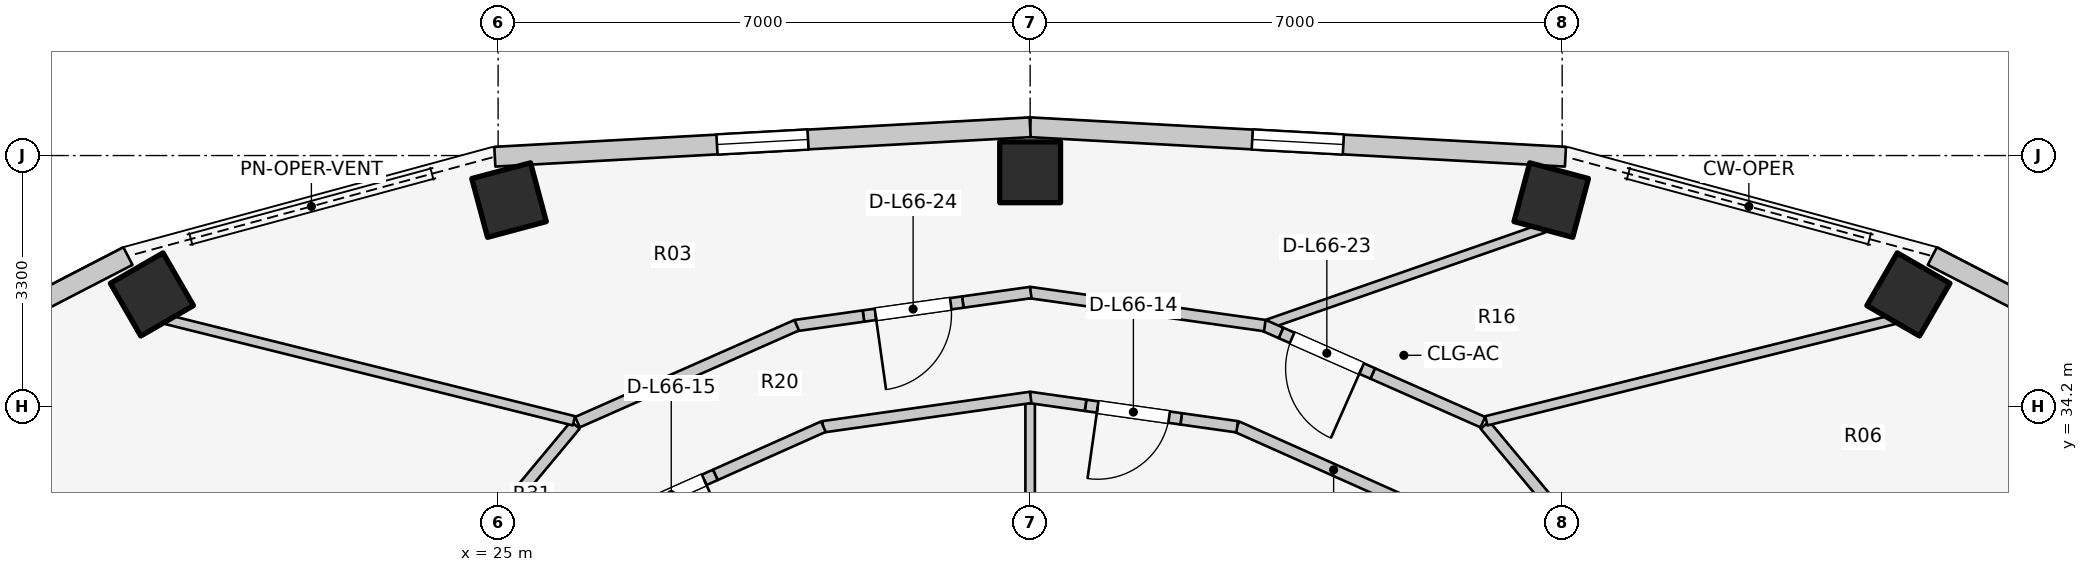
"""IFC4 building model, lengths in metres.
Left out: names, types, materials, properties, quantities, classifications, styles, units other than length and angle.
Written with IfcOpenShell. Run it as: python <this file> out.ifc"""

import sys

from ifc_helpers import new_model, si_unit, direction, frame, frame_2d, origin, origin_2d, place, context, subcontext, project, spatial, rectangle, extrude, element, fill, save


model = new_model("IFC4")
c1 = context("Model", 3, precision=1e-05, world=origin(), true_north=direction((0.0, 1.0)))
c2 = subcontext(c1, "Body", "Model", "MODEL_VIEW")
j1 = project(units=[si_unit("LENGTHUNIT", "METRE"), si_unit("PLANEANGLEUNIT", "RADIAN")], contexts=[c1])
p1 = place(None, origin())
s1 = spatial("IfcSite", under=j1, at=p1, CompositionType="ELEMENT")
p2 = place(p1, origin())
s2 = spatial("IfcBuilding", under=s1, at=p2, CompositionType="ELEMENT")
p3 = place(p2, frame((0.0, 0.0, 217.1)))
s3 = spatial("IfcBuildingStorey", under=s2, at=p3, CompositionType="ELEMENT", Elevation=217.1)
for number, where, z_axis, x_axis in (
    (1, (43.555, 35.673, 0.0), (0.0, 0.0, 1.0), (0.5, 0.866, 0.0)),
    (2, (38.856, 36.914, 0.0), (0.0, 0.0, 1.0), (0.259, 0.966, 0.0)),
    (3, (32.0, 37.28, 0.0), (0.0, 0.0, 1.0), (0.0, 1.0, 0.0)),
    (4, (25.144, 36.914, 0.0), (0.0, 0.0, 1.0), (-0.259, 0.966, 0.0)),
    (5, (20.445, 35.673, 0.0), (0.0, 0.0, 1.0), (-0.5, 0.866, 0.0)),
):
    element("IfcColumn", number, at=place(p3, frame(where, z_axis=z_axis, x_axis=x_axis)), inside=s3, PredefinedType="COLUMN", context=c2, shape_type="SweptSolid", body=[
        extrude(rectangle(XDim=0.8, YDim=0.8, at=origin_2d()), origin(), (0.0, 0.0, 1.0), 3.1),
    ])
p4 = place(p3, frame((47.558, 34.272, 0.0), z_axis=(0.0, 0.0, 1.0), x_axis=(-0.88849146803, 0.458893137057, 0.0)))
e6 = element("IfcWall", 6, at=p4, inside=s3, PredefinedType="STANDARD", context=c2, shape_type="SweptSolid", body=[
    extrude(rectangle(XDim=4.15, YDim=0.26, at=frame_2d((2.075, 0.0))), origin(), (0.0, 0.0, 1.0), 1.22),
])
p5 = place(p3, frame((39.043, 37.485, 0.0), z_axis=(0.0, 0.0, 1.0), x_axis=(-0.998490239527, 0.054929423535, 0.0)))
e7 = element("IfcWall", 7, at=p5, inside=s3, PredefinedType="STANDARD", context=c2, shape_type="SweptSolid", body=[
    extrude(rectangle(XDim=7.054, YDim=0.26, at=frame_2d((3.527, 0.0))), origin(), (0.0, 0.0, 1.0), 1.22),
])
p6 = place(p5, frame((2.927, 0.0, 0.15)))
e8 = element("IfcOpeningElement", 8, at=p6, cuts=e7, PredefinedType="OPENING", context=c2, shape_type="SweptSolid", body=[
    extrude(rectangle(XDim=1.2, YDim=0.9, at=frame_2d((0.6, 0.45))), frame((0.0, 0.14, 0.0), z_axis=(0.0, -1.0, 0.0), x_axis=(1.0, 0.0, 0.0)), (0.0, 0.0, 1.0), 0.28),
])
p7 = place(p3, frame((32.0, 37.872, 0.0), z_axis=(0.0, 0.0, 1.0), x_axis=(-0.998490239527, -0.054929423535, 0.0)))
e9 = element("IfcWall", 9, at=p7, inside=s3, PredefinedType="STANDARD", context=c2, shape_type="SweptSolid", body=[
    extrude(rectangle(XDim=7.054, YDim=0.26, at=frame_2d((3.527, 0.0))), origin(), (0.0, 0.0, 1.0), 1.22),
])
p8 = place(p7, frame((2.927, 0.0, 0.15)))
e10 = element("IfcOpeningElement", 10, at=p8, cuts=e9, PredefinedType="OPENING", context=c2, shape_type="SweptSolid", body=[
    extrude(rectangle(XDim=1.2, YDim=0.9, at=frame_2d((0.6, 0.45))), frame((0.0, 0.14, 0.0), z_axis=(0.0, -1.0, 0.0), x_axis=(1.0, 0.0, 0.0)), (0.0, 0.0, 1.0), 0.28),
])
p9 = place(p3, frame((20.13, 36.177, 0.0), z_axis=(0.0, 0.0, 1.0), x_axis=(-0.88849146803, -0.458893137057, 0.0)))
e11 = element("IfcWall", 11, at=p9, inside=s3, PredefinedType="STANDARD", context=c2, shape_type="SweptSolid", body=[
    extrude(rectangle(XDim=4.15, YDim=0.26, at=frame_2d((2.075, 0.0))), origin(), (0.0, 0.0, 1.0), 1.22),
])
p10 = place(p3, frame((32.0, 31.1, 0.0), z_axis=(0.0, 0.0, 1.0), x_axis=(0.0, 1.0, 0.0)))
e12 = element("IfcWall", 12, at=p10, inside=s3, PredefinedType="PARTITIONING", context=c2, shape_type="SweptSolid", body=[
    extrude(rectangle(XDim=3.218, YDim=0.125, at=frame_2d((1.609, 0.0))), origin(), (0.0, 0.0, 1.0), 1.22),
])
p11 = place(p3, frame((37.265, 32.798, 0.0), z_axis=(0.0, 0.0, 1.0), x_axis=(-0.913254317828, 0.407389924971, 0.0)))
e13 = element("IfcWall", 13, at=p11, inside=s3, PredefinedType="PARTITIONING", context=c2, shape_type="SweptSolid", body=[
    extrude(rectangle(XDim=2.787, YDim=0.15, at=frame_2d((1.393, 0.0))), origin(), (0.0, 0.0, 1.0), 1.22),
])
p12 = place(p3, frame((34.724, 33.932, 0.0), z_axis=(0.0, 0.0, 1.0), x_axis=(-0.990190745647, 0.13972217875, 0.0)))
e14 = element("IfcWall", 14, at=p12, inside=s3, PredefinedType="PARTITIONING", context=c2, shape_type="SweptSolid", body=[
    extrude(rectangle(XDim=0.744, YDim=0.15, at=frame_2d((0.372, 0.0))), origin(), (0.0, 0.0, 1.0), 2.105),
])
p13 = place(p3, frame((33.987, 34.036, 0.0), z_axis=(0.0, 0.0, 1.0), x_axis=(-0.990133183593, 0.140129507055, 0.0)))
e15 = element("IfcWall", 15, at=p13, inside=s3, PredefinedType="PARTITIONING", context=c2, shape_type="SweptSolid", body=[
    extrude(rectangle(XDim=1.27, YDim=0.15, at=frame_2d((0.635, 0.0))), origin(), (0.0, 0.0, 1.0), 2.16),
])
p14 = place(p13, frame((0.16, 0.0, 0.0)))
e16 = element("IfcOpeningElement", 16, at=p14, cuts=e15, PredefinedType="OPENING", context=c2, shape_type="SweptSolid", body=[
    extrude(rectangle(XDim=0.95, YDim=2.1, at=frame_2d((0.475, 1.05))), frame((0.0, 0.085, 0.0), z_axis=(0.0, -1.0, 0.0), x_axis=(1.0, 0.0, 0.0)), (0.0, 0.0, 1.0), 0.17),
])
p15 = place(p3, frame((32.729, 34.214, 0.0), z_axis=(0.0, 0.0, 1.0), x_axis=(-0.990138882688, 0.140089232242, 0.0)))
e17 = element("IfcWall", 17, at=p15, inside=s3, PredefinedType="PARTITIONING", context=c2, shape_type="SweptSolid", body=[
    extrude(rectangle(XDim=0.744, YDim=0.15, at=frame_2d((0.372, 0.0))), origin(), (0.0, 0.0, 1.0), 1.22),
])
p16 = place(p3, frame((32.007, 34.318, 0.0), z_axis=(0.0, 0.0, 1.0), x_axis=(-0.990150268487, -0.140008734782, 0.0)))
e18 = element("IfcWall", 18, at=p16, inside=s3, PredefinedType="PARTITIONING", context=c2, shape_type="SweptSolid", body=[
    extrude(rectangle(XDim=2.759, YDim=0.15, at=frame_2d((1.379, 0.0))), origin(), (0.0, 0.0, 1.0), 1.22),
])
p17 = place(p3, frame((29.28, 33.933, 0.0), z_axis=(0.0, 0.0, 1.0), x_axis=(-0.913286906099, -0.407316863324, 0.0)))
e19 = element("IfcWall", 19, at=p17, inside=s3, PredefinedType="PARTITIONING", context=c2, shape_type="SweptSolid", body=[
    extrude(rectangle(XDim=1.557, YDim=0.15, at=frame_2d((0.778, 0.0))), origin(), (0.0, 0.0, 1.0), 1.22),
])
p18 = place(p3, frame((27.858, 33.299, 0.0), z_axis=(0.0, 0.0, 1.0), x_axis=(-0.91321306925, -0.407482380172, 0.0)))
e20 = element("IfcWall", 20, at=p18, inside=s3, PredefinedType="PARTITIONING", context=c2, shape_type="SweptSolid", body=[
    extrude(rectangle(XDim=1.23, YDim=0.15, at=frame_2d((0.615, 0.0))), origin(), (0.0, 0.0, 1.0), 2.16),
])
p19 = place(p18, frame((0.16, 0.0, 0.0)))
e21 = element("IfcOpeningElement", 21, at=p19, cuts=e20, PredefinedType="OPENING", context=c2, shape_type="SweptSolid", body=[
    extrude(rectangle(XDim=0.95, YDim=2.1, at=frame_2d((0.475, 1.05))), frame((0.0, 0.085, 0.0), z_axis=(0.0, -1.0, 0.0), x_axis=(1.0, 0.0, 0.0)), (0.0, 0.0, 1.0), 0.17),
])
for number, where, z_axis, x_axis in (
    (22, (37.984, 33.955, 0.0), (0.0, 0.0, 1.0), (0.64, -0.768, 0.0)),
    (23, (26.016, 33.955, 0.0), (0.0, 0.0, 1.0), (-0.64, -0.768, 0.0)),
):
    element("IfcWall", number, at=place(p3, frame(where, z_axis=z_axis, x_axis=x_axis)), inside=s3, PredefinedType="PARTITIONING", context=c2, shape_type="SweptSolid", body=[
        extrude(rectangle(XDim=2.21, YDim=0.15, at=frame_2d((1.105, 0.0))), origin(), (0.0, 0.0, 1.0), 1.22),
    ])
p20 = place(p3, frame((38.002, 34.01, 0.0), z_axis=(0.0, 0.0, 1.0), x_axis=(0.970445810114, 0.241319144769, 0.0)))
e24 = element("IfcWall", 24, at=p20, inside=s3, PredefinedType="PARTITIONING", context=c2, shape_type="SweptSolid", body=[
    extrude(rectangle(XDim=5.526, YDim=0.125, at=frame_2d((2.763, 0.0))), origin(), (0.0, 0.0, 1.0), 1.22),
])
p21 = place(p3, frame((35.131, 35.283, 0.0), z_axis=(0.0, 0.0, 1.0), x_axis=(0.944311395416, 0.329053169697, 0.0)))
e25 = element("IfcWall", 25, at=p21, inside=s3, PredefinedType="PARTITIONING", context=c2, shape_type="SweptSolid", body=[
    extrude(rectangle(XDim=3.84, YDim=0.125, at=frame_2d((1.92, 0.0))), origin(), (0.0, 0.0, 1.0), 1.22),
])
p22 = place(p3, frame((25.998, 34.01, 0.0), z_axis=(0.0, 0.0, 1.0), x_axis=(-0.970445810114, 0.241319144769, 0.0)))
e26 = element("IfcWall", 26, at=p22, inside=s3, PredefinedType="PARTITIONING", context=c2, shape_type="SweptSolid", body=[
    extrude(rectangle(XDim=5.526, YDim=0.125, at=frame_2d((2.763, 0.0))), origin(), (0.0, 0.0, 1.0), 1.22),
])
p23 = place(p3, frame((37.956, 33.992, 0.0), z_axis=(0.0, 0.0, 1.0), x_axis=(-0.914654802586, 0.404235812499, 0.0)))
e27 = element("IfcWall", 27, at=p23, inside=s3, PredefinedType="PARTITIONING", context=c2, shape_type="SweptSolid", body=[
    extrude(rectangle(XDim=1.584, YDim=0.15, at=frame_2d((0.792, 0.0))), origin(), (0.0, 0.0, 1.0), 1.22),
])
p24 = place(p3, frame((36.507, 34.633, 0.0), z_axis=(0.0, 0.0, 1.0), x_axis=(-0.914618215061, 0.404318588094, 0.0)))
e28 = element("IfcWall", 28, at=p24, inside=s3, PredefinedType="PARTITIONING", context=c2, shape_type="SweptSolid", body=[
    extrude(rectangle(XDim=1.32, YDim=0.15, at=frame_2d((0.66, 0.0))), origin(), (0.0, 0.0, 1.0), 2.16),
])
p25 = place(p24, frame((0.16, 0.0, 0.0)))
e29 = element("IfcOpeningElement", 29, at=p25, cuts=e28, PredefinedType="OPENING", context=c2, shape_type="SweptSolid", body=[
    extrude(rectangle(XDim=1.0, YDim=2.1, at=frame_2d((0.5, 1.05))), frame((0.0, 0.085, 0.0), z_axis=(0.0, -1.0, 0.0), x_axis=(1.0, 0.0, 0.0)), (0.0, 0.0, 1.0), 0.17),
])
p26 = place(p3, frame((35.3, 35.167, 0.0), z_axis=(0.0, 0.0, 1.0), x_axis=(-0.914694996527, 0.404144854389, 0.0)))
e30 = element("IfcWall", 30, at=p26, inside=s3, PredefinedType="PARTITIONING", context=c2, shape_type="SweptSolid", body=[
    extrude(rectangle(XDim=0.25, YDim=0.15, at=frame_2d((0.125, 0.0))), origin(), (0.0, 0.0, 1.0), 2.575),
])
p27 = place(p3, frame((35.087, 35.263, 0.0), z_axis=(0.0, 0.0, 1.0), x_axis=(-0.990268690673, 0.139168675614, 0.0)))
e31 = element("IfcWall", 31, at=p27, inside=s3, PredefinedType="PARTITIONING", context=c2, shape_type="SweptSolid", body=[
    extrude(rectangle(XDim=3.126, YDim=0.15, at=frame_2d((1.563, 0.0))), origin(), (0.0, 0.0, 1.0), 1.22),
])
p28 = place(p3, frame((32.008, 35.698, 0.0), z_axis=(0.0, 0.0, 1.0), x_axis=(-0.990260655864, -0.139225836137, 0.0)))
e32 = element("IfcWall", 32, at=p28, inside=s3, PredefinedType="PARTITIONING", context=c2, shape_type="SweptSolid", body=[
    extrude(rectangle(XDim=0.903, YDim=0.15, at=frame_2d((0.452, 0.0))), origin(), (0.0, 0.0, 1.0), 1.22),
])
p29 = place(p3, frame((31.114, 35.572, 0.0), z_axis=(0.0, 0.0, 1.0), x_axis=(-0.990279679751, -0.139090459315, 0.0)))
e33 = element("IfcWall", 33, at=p29, inside=s3, PredefinedType="PARTITIONING", context=c2, shape_type="SweptSolid", body=[
    extrude(rectangle(XDim=1.32, YDim=0.15, at=frame_2d((0.66, 0.0))), origin(), (0.0, 0.0, 1.0), 2.575),
])
p30 = place(p29, frame((0.16, 0.0, 0.0)))
e34 = element("IfcOpeningElement", 34, at=p30, cuts=e33, PredefinedType="OPENING", context=c2, shape_type="SweptSolid", body=[
    extrude(rectangle(XDim=1.0, YDim=2.1, at=frame_2d((0.5, 1.05))), frame((0.0, 0.085, 0.0), z_axis=(0.0, -1.0, 0.0), x_axis=(1.0, 0.0, 0.0)), (0.0, 0.0, 1.0), 0.17),
])
p31 = place(p3, frame((29.807, 35.389, 0.0), z_axis=(0.0, 0.0, 1.0), x_axis=(-0.990260655864, -0.139225836137, 0.0)))
e35 = element("IfcWall", 35, at=p31, inside=s3, PredefinedType="PARTITIONING", context=c2, shape_type="SweptSolid", body=[
    extrude(rectangle(XDim=0.903, YDim=0.15, at=frame_2d((0.452, 0.0))), origin(), (0.0, 0.0, 1.0), 2.575),
])
p32 = place(p3, frame((28.929, 35.268, 0.0), z_axis=(0.0, 0.0, 1.0), x_axis=(-0.914642679993, -0.404263240891, 0.0)))
e36 = element("IfcWall", 36, at=p32, inside=s3, PredefinedType="PARTITIONING", context=c2, shape_type="SweptSolid", body=[
    extrude(rectangle(XDim=3.154, YDim=0.15, at=frame_2d((1.577, 0.0))), origin(), (0.0, 0.0, 1.0), 1.22),
])
p33 = place(p6, origin())
e37 = element("IfcWindow", 37, at=p33, inside=s3, PartitioningType="SINGLE_PANEL", PredefinedType="WINDOW", context=c2, shape_type="SweptSolid", body=[
    extrude(rectangle(XDim=1.2, YDim=0.9, at=frame_2d((0.6, 0.45))), frame((0.0, 0.03, 0.0), z_axis=(0.0, -1.0, 0.0), x_axis=(1.0, 0.0, 0.0)), (0.0, 0.0, 1.0), 0.06),
])
fill(e8, e37)
p34 = place(p8, origin())
e38 = element("IfcWindow", 38, at=p34, inside=s3, PartitioningType="SINGLE_PANEL", PredefinedType="WINDOW", context=c2, shape_type="SweptSolid", body=[
    extrude(rectangle(XDim=1.2, YDim=0.9, at=frame_2d((0.6, 0.45))), frame((0.0, 0.03, 0.0), z_axis=(0.0, -1.0, 0.0), x_axis=(1.0, 0.0, 0.0)), (0.0, 0.0, 1.0), 0.06),
])
fill(e10, e38)
p35 = place(p14, origin())
e39 = element("IfcDoor", 39, at=p35, inside=s3, OperationType="SINGLE_SWING_RIGHT", PredefinedType="DOOR", context=c2, shape_type="SweptSolid", body=[
    extrude(rectangle(XDim=0.95, YDim=2.1, at=frame_2d((0.475, 1.05))), frame((0.0, 0.025, 0.0), z_axis=(0.0, -1.0, 0.0), x_axis=(1.0, 0.0, 0.0)), (0.0, 0.0, 1.0), 0.05),
])
fill(e16, e39)
p36 = place(p19, origin())
e40 = element("IfcDoor", 40, at=p36, inside=s3, OperationType="SINGLE_SWING_LEFT", PredefinedType="DOOR", context=c2, shape_type="SweptSolid", body=[
    extrude(rectangle(XDim=0.95, YDim=2.1, at=frame_2d((0.475, 1.05))), frame((0.0, 0.025, 0.0), z_axis=(0.0, -1.0, 0.0), x_axis=(1.0, 0.0, 0.0)), (0.0, 0.0, 1.0), 0.05),
])
fill(e21, e40)
p37 = place(p25, origin())
e41 = element("IfcDoor", 41, at=p37, inside=s3, OperationType="SINGLE_SWING_LEFT", PredefinedType="DOOR", context=c2, shape_type="SweptSolid", body=[
    extrude(rectangle(XDim=1.0, YDim=2.1, at=frame_2d((0.5, 1.05))), frame((0.0, 0.025, 0.0), z_axis=(0.0, -1.0, 0.0), x_axis=(1.0, 0.0, 0.0)), (0.0, 0.0, 1.0), 0.05),
])
fill(e29, e41)
p38 = place(p30, origin())
e42 = element("IfcDoor", 42, at=p38, inside=s3, OperationType="SINGLE_SWING_RIGHT", PredefinedType="DOOR", context=c2, shape_type="SweptSolid", body=[
    extrude(rectangle(XDim=1.0, YDim=2.1, at=frame_2d((0.5, 1.05))), frame((0.0, 0.025, 0.0), z_axis=(0.0, -1.0, 0.0), x_axis=(1.0, 0.0, 0.0)), (0.0, 0.0, 1.0), 0.05),
])
fill(e34, e42)
save(model, sys.argv[1])
